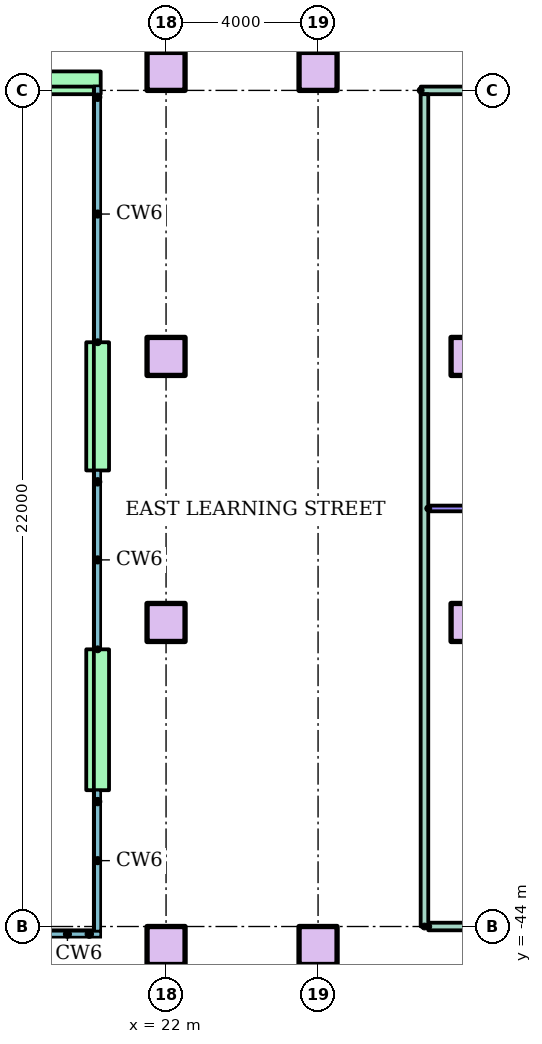
"""IFC4 building model, lengths in metres.
Left out: names, types, materials, properties, quantities, classifications, styles, units other than length and angle.
Written with IfcOpenShell. Run it as: python <this file> out.ifc"""

import sys

from ifc_helpers import new_model, si_unit, direction, frame, frame_2d, origin, origin_2d, place, context, subcontext, project, spatial, rectangle, extrude, element, save


model = new_model("IFC4")
c1 = context("Model", 3, precision=1e-05, world=origin(), true_north=direction((0.0, 1.0)))
c2 = subcontext(c1, "Body", "Model", "MODEL_VIEW")
j1 = project(units=[si_unit("LENGTHUNIT", "METRE"), si_unit("PLANEANGLEUNIT", "RADIAN")], contexts=[c1])
p1 = place(None, origin())
s1 = spatial("IfcSite", under=j1, at=p1, CompositionType="ELEMENT")
p2 = place(p1, origin())
s2 = spatial("IfcBuilding", under=s1, at=p2, CompositionType="ELEMENT")
p3 = place(p2, frame((0.0, 0.0, 6.0)))
s3 = spatial("IfcBuildingStorey", under=s2, at=p3, CompositionType="ELEMENT", Elevation=6.0)
for number, where in (
    (1, (22.0, -44.5, 0.0)),
    (2, (26.0, -44.5, 0.0)),
    (3, (22.0, -36.0, 0.0)),
    (4, (30.0, -36.0, 0.0)),
    (5, (22.0, -29.0, 0.0)),
    (6, (30.0, -29.0, 0.0)),
    (7, (22.0, -21.5, 0.0)),
    (8, (26.0, -21.5, 0.0)),
):
    element("IfcColumn", number, at=place(p3, frame(where)), inside=s3, PredefinedType="COLUMN", context=c2, shape_type="SweptSolid", body=[
        extrude(rectangle(XDim=1.0, YDim=1.0, at=origin_2d()), origin(), (0.0, 0.0, 1.0), 4.0),
    ])
p4 = place(p3, frame((18.53, -21.8, 0.0)))
e9 = element("IfcWall", 9, at=p4, inside=s3, PredefinedType="STANDARD", context=c2, shape_type="SweptSolid", body=[
    extrude(rectangle(XDim=1.75, YDim=0.6, at=frame_2d((0.875, 0.0))), origin(), (0.0, 0.0, 1.0), 3.7),
])
p5 = place(p3, frame((20.2, -28.627, 0.0), z_axis=(0.0, 0.0, 1.0), x_axis=(0.0, -1.0, 0.0)))
e10 = element("IfcWall", 10, at=p5, inside=s3, PredefinedType="STANDARD", context=c2, shape_type="SweptSolid", body=[
    extrude(rectangle(XDim=3.373, YDim=0.6, at=frame_2d((1.687, 0.0))), origin(), (0.0, 0.0, 1.0), 3.7),
])
p6 = place(p3, frame((20.2, -36.707, 0.0), z_axis=(0.0, 0.0, 1.0), x_axis=(0.0, -1.0, 0.0)))
e11 = element("IfcWall", 11, at=p6, inside=s3, PredefinedType="STANDARD", context=c2, shape_type="SweptSolid", body=[
    extrude(rectangle(XDim=3.707, YDim=0.6, at=frame_2d((1.853, 0.0))), origin(), (0.0, 0.0, 1.0), 3.7),
])
p7 = place(p3, frame((28.9, -44.0, 0.0)))
e12 = element("IfcWall", 12, at=p7, inside=s3, PredefinedType="PARTITIONING", context=c2, shape_type="SweptSolid", body=[
    extrude(rectangle(XDim=4.6, YDim=0.2, at=frame_2d((2.3, 0.0))), origin(), (0.0, 0.0, 1.0), 3.7),
])
p8 = place(p7, frame((1.864, 0.0, 0.0)))
e13 = element("IfcOpeningElement", 13, at=p8, cuts=e12, PredefinedType="OPENING", context=c2, shape_type="SweptSolid", body=[
    extrude(rectangle(XDim=1.0, YDim=2.1, at=frame_2d((0.5, 1.05))), frame((0.0, 0.11, 0.0), z_axis=(0.0, -1.0, 0.0), x_axis=(1.0, 0.0, 0.0)), (0.0, 0.0, 1.0), 0.22),
])
p9 = place(p7, frame((3.25, 0.0, 0.0)))
e14 = element("IfcOpeningElement", 14, at=p9, cuts=e12, PredefinedType="OPENING", context=c2, shape_type="SweptSolid", body=[
    extrude(rectangle(XDim=1.0, YDim=2.1, at=frame_2d((0.5, 1.05))), frame((0.0, 0.11, 0.0), z_axis=(0.0, -1.0, 0.0), x_axis=(1.0, 0.0, 0.0)), (0.0, 0.0, 1.0), 0.22),
])
p10 = place(p3, frame((28.9, -33.0, 0.0)))
e15 = element("IfcWall", 15, at=p10, inside=s3, PredefinedType="PARTITIONING", context=c2, shape_type="SweptSolid", body=[
    extrude(rectangle(XDim=10.7, YDim=0.15, at=frame_2d((5.35, 0.0))), origin(), (0.0, 0.0, 1.0), 3.7),
])
p11 = place(p3, frame((28.7, -22.0, 0.0)))
e16 = element("IfcWall", 16, at=p11, inside=s3, PredefinedType="PARTITIONING", context=c2, shape_type="SweptSolid", body=[
    extrude(rectangle(XDim=4.8, YDim=0.2, at=frame_2d((2.4, 0.0))), origin(), (0.0, 0.0, 1.0), 3.7),
])
p12 = place(p11, frame((2.064, 0.0, 0.0)))
e17 = element("IfcOpeningElement", 17, at=p12, cuts=e16, PredefinedType="OPENING", context=c2, shape_type="SweptSolid", body=[
    extrude(rectangle(XDim=1.0, YDim=2.1, at=frame_2d((0.5, 1.05))), frame((0.0, 0.11, 0.0), z_axis=(0.0, -1.0, 0.0), x_axis=(1.0, 0.0, 0.0)), (0.0, 0.0, 1.0), 0.22),
])
p13 = place(p11, frame((3.45, 0.0, 0.0)))
e18 = element("IfcOpeningElement", 18, at=p13, cuts=e16, PredefinedType="OPENING", context=c2, shape_type="SweptSolid", body=[
    extrude(rectangle(XDim=1.0, YDim=2.1, at=frame_2d((0.5, 1.05))), frame((0.0, 0.11, 0.0), z_axis=(0.0, -1.0, 0.0), x_axis=(1.0, 0.0, 0.0)), (0.0, 0.0, 1.0), 0.22),
])
p14 = place(p3, frame((28.8, -44.0, 0.0), z_axis=(0.0, 0.0, 1.0), x_axis=(0.0, 1.0, 0.0)))
e19 = element("IfcWall", 19, at=p14, inside=s3, PredefinedType="PARTITIONING", context=c2, shape_type="SweptSolid", body=[
    extrude(rectangle(XDim=21.9, YDim=0.2, at=frame_2d((10.95, 0.0))), origin(), (0.0, 0.0, 1.0), 3.7),
])
save(model, sys.argv[1])
